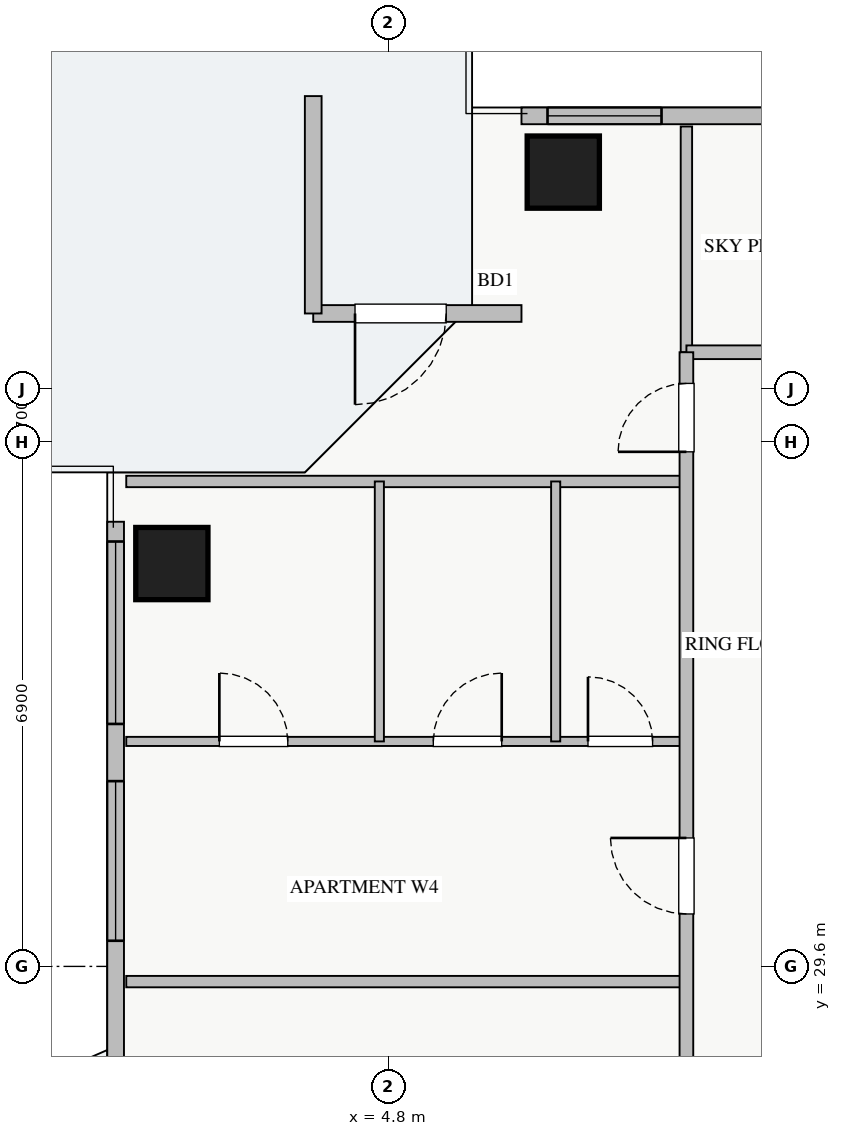
"""IFC4 building model, lengths in metres.
Left out: names, types, materials, properties, quantities, classifications, styles, units other than length and angle.
Written with IfcOpenShell. Run it as: python <this file> out.ifc"""

import sys

from ifc_helpers import new_model, si_unit, direction, frame, frame_2d, origin, origin_2d, place, context, subcontext, project, spatial, rectangle, extrude, source, transform, mapped, element, fill, save


model = new_model("IFC4")
c1 = context("Model", 3, precision=1e-05, world=origin(), true_north=direction((0.0, 1.0)))
c2 = subcontext(c1, "Body", "Model", "MODEL_VIEW")
j1 = project(units=[si_unit("LENGTHUNIT", "METRE"), si_unit("PLANEANGLEUNIT", "RADIAN")], contexts=[c1])
p1 = place(None, origin())
s1 = spatial("IfcSite", under=j1, at=p1, CompositionType="ELEMENT")
p2 = place(p1, origin())
s2 = spatial("IfcBuilding", under=s1, at=p2, CompositionType="ELEMENT")
p3 = place(p2, frame((0.0, 0.0, 182.75)))
s3 = spatial("IfcBuildingStorey", under=s2, at=p3, CompositionType="ELEMENT", Elevation=182.75)
m1 = source(origin(), c2, "Body", "SweptSolid", [
    extrude(rectangle(XDim=0.95, YDim=0.95, at=origin_2d()), origin(), (0.0, 0.0, 1.0), 3.25),
])
for number, where, z_axis, x_axis in (
    (1, (7.1, 40.05, 0.0), (0.0, 0.0, 1.0), (1.0, 0.0, 0.0)),
    (2, (1.95, 34.9, 0.0), (0.0, 0.0, 1.0), (1.0, 0.0, 0.0)),
):
    element("IfcColumn", number, at=place(p3, frame(where, z_axis=z_axis, x_axis=x_axis)), inside=s3, PredefinedType="COLUMN", context=c2, shape_type="MappedRepresentation", body=[
        mapped(m1, transform((0.0, 0.0, 0.0), x_axis=(1.0, 0.0, 0.0), y_axis=(0.0, 1.0, 0.0), z_axis=(0.0, 0.0, 1.0), scale=1.0)),
    ])
p4 = place(p3, frame((6.55, 40.79, 0.0), z_axis=(0.0, 0.0, 1.0), x_axis=(1.0, 0.0, 0.0)))
e3 = element("IfcWall", 3, at=p4, inside=s3, PredefinedType="STANDARD", context=c2, shape_type="SweptSolid", body=[
    extrude(rectangle(XDim=24.9, YDim=0.22, at=frame_2d((12.45, 0.0))), origin(), (0.0, 0.0, 1.0), 2.57),
])
p5 = place(p4, frame((13.3, 0.0, 0.0)))
e4 = element("IfcOpeningElement", 4, at=p5, cuts=e3, PredefinedType="OPENING", context=c2, shape_type="SweptSolid", body=[
    extrude(rectangle(XDim=1.2, YDim=2.1, at=frame_2d((0.6, 1.05))), frame((0.0, 0.12, 0.0), z_axis=(0.0, -1.0, 0.0), x_axis=(1.0, 0.0, 0.0)), (0.0, 0.0, 1.0), 0.24),
])
p6 = place(p4, frame((0.343, 0.0, 0.9)))
e5 = element("IfcOpeningElement", 5, at=p6, cuts=e3, PredefinedType="OPENING", context=c2, shape_type="SweptSolid", body=[
    extrude(rectangle(XDim=1.5, YDim=1.5, at=frame_2d((0.75, 0.75))), frame((0.0, 0.12, 0.0), z_axis=(0.0, -1.0, 0.0), x_axis=(1.0, 0.0, 0.0)), (0.0, 0.0, 1.0), 0.24),
])
p7 = place(p4, frame((9.79, 0.0, 0.9)))
e6 = element("IfcOpeningElement", 6, at=p7, cuts=e3, PredefinedType="OPENING", context=c2, shape_type="SweptSolid", body=[
    extrude(rectangle(XDim=1.8, YDim=1.5, at=frame_2d((0.9, 0.75))), frame((0.0, 0.12, 0.0), z_axis=(0.0, -1.0, 0.0), x_axis=(1.0, 0.0, 0.0)), (0.0, 0.0, 1.0), 0.24),
])
p8 = place(p4, frame((14.813, 0.0, 0.9)))
e7 = element("IfcOpeningElement", 7, at=p8, cuts=e3, PredefinedType="OPENING", context=c2, shape_type="SweptSolid", body=[
    extrude(rectangle(XDim=1.5, YDim=1.45, at=frame_2d((0.75, 0.725))), frame((0.0, 0.12, 0.0), z_axis=(0.0, -1.0, 0.0), x_axis=(1.0, 0.0, 0.0)), (0.0, 0.0, 1.0), 0.24),
])
p9 = place(p4, frame((20.738, 0.0, 0.9)))
e8 = element("IfcOpeningElement", 8, at=p9, cuts=e3, PredefinedType="OPENING", context=c2, shape_type="SweptSolid", body=[
    extrude(rectangle(XDim=2.1, YDim=1.48, at=frame_2d((1.05, 0.74))), frame((0.0, 0.12, 0.0), z_axis=(0.0, -1.0, 0.0), x_axis=(1.0, 0.0, 0.0)), (0.0, 0.0, 1.0), 0.24),
])
p10 = place(p4, frame((4.122, 0.0, 0.9)))
e9 = element("IfcOpeningElement", 9, at=p10, cuts=e3, PredefinedType="OPENING", context=c2, shape_type="SweptSolid", body=[
    extrude(rectangle(XDim=2.4, YDim=1.5, at=frame_2d((1.2, 0.75))), frame((0.0, 0.12, 0.0), z_axis=(0.0, -1.0, 0.0), x_axis=(1.0, 0.0, 0.0)), (0.0, 0.0, 1.0), 0.24),
])
p11 = place(p4, frame((6.758, 0.0, 0.9)))
e10 = element("IfcOpeningElement", 10, at=p11, cuts=e3, PredefinedType="OPENING", context=c2, shape_type="SweptSolid", body=[
    extrude(rectangle(XDim=1.8, YDim=1.5, at=frame_2d((0.9, 0.75))), frame((0.0, 0.12, 0.0), z_axis=(0.0, -1.0, 0.0), x_axis=(1.0, 0.0, 0.0)), (0.0, 0.0, 1.0), 0.24),
])
p12 = place(p3, frame((1.21, 10.55, 0.0), z_axis=(0.0, 0.0, 1.0), x_axis=(0.0, 1.0, 0.0)))
e11 = element("IfcWall", 11, at=p12, inside=s3, PredefinedType="STANDARD", context=c2, shape_type="SweptSolid", body=[
    extrude(rectangle(XDim=24.9, YDim=0.22, at=frame_2d((12.45, 0.0))), origin(), (0.0, 0.0, 1.0), 2.57),
])
p13 = place(p12, frame((13.3, 0.0, 0.0)))
e12 = element("IfcOpeningElement", 12, at=p13, cuts=e11, PredefinedType="OPENING", context=c2, shape_type="SweptSolid", body=[
    extrude(rectangle(XDim=1.2, YDim=2.1, at=frame_2d((0.6, 1.05))), frame((0.0, 0.12, 0.0), z_axis=(0.0, -1.0, 0.0), x_axis=(1.0, 0.0, 0.0)), (0.0, 0.0, 1.0), 0.24),
])
p14 = place(p12, frame((2.573, 0.0, 0.9)))
e13 = element("IfcOpeningElement", 13, at=p14, cuts=e11, PredefinedType="OPENING", context=c2, shape_type="SweptSolid", body=[
    extrude(rectangle(XDim=2.1, YDim=1.5, at=frame_2d((1.05, 0.75))), frame((0.0, 0.12, 0.0), z_axis=(0.0, -1.0, 0.0), x_axis=(1.0, 0.0, 0.0)), (0.0, 0.0, 1.0), 0.24),
])
p15 = place(p12, frame((19.387, 0.0, 0.9)))
e14 = element("IfcOpeningElement", 14, at=p15, cuts=e11, PredefinedType="OPENING", context=c2, shape_type="SweptSolid", body=[
    extrude(rectangle(XDim=2.1, YDim=1.5, at=frame_2d((1.05, 0.75))), frame((0.0, 0.12, 0.0), z_axis=(0.0, -1.0, 0.0), x_axis=(1.0, 0.0, 0.0)), (0.0, 0.0, 1.0), 0.24),
])
p16 = place(p12, frame((22.24, 0.0, 0.9)))
e15 = element("IfcOpeningElement", 15, at=p16, cuts=e11, PredefinedType="OPENING", context=c2, shape_type="SweptSolid", body=[
    extrude(rectangle(XDim=2.4, YDim=1.5, at=frame_2d((1.2, 0.75))), frame((0.0, 0.12, 0.0), z_axis=(0.0, -1.0, 0.0), x_axis=(1.0, 0.0, 0.0)), (0.0, 0.0, 1.0), 0.24),
])
p17 = place(p12, frame((0.25, 0.0, 0.9)))
e16 = element("IfcOpeningElement", 16, at=p17, cuts=e11, PredefinedType="OPENING", context=c2, shape_type="SweptSolid", body=[
    extrude(rectangle(XDim=0.9, YDim=1.2, at=frame_2d((0.45, 0.6))), frame((0.0, 0.12, 0.0), z_axis=(0.0, -1.0, 0.0), x_axis=(1.0, 0.0, 0.0)), (0.0, 0.0, 1.0), 0.24),
])
p18 = place(p12, frame((8.01, 0.0, 0.9)))
e17 = element("IfcOpeningElement", 17, at=p18, cuts=e11, PredefinedType="OPENING", context=c2, shape_type="SweptSolid", body=[
    extrude(rectangle(XDim=0.9, YDim=1.2, at=frame_2d((0.45, 0.6))), frame((0.0, 0.12, 0.0), z_axis=(0.0, -1.0, 0.0), x_axis=(1.0, 0.0, 0.0)), (0.0, 0.0, 1.0), 0.24),
])
p19 = place(p12, frame((5.215, 0.0, 0.9)))
e18 = element("IfcOpeningElement", 18, at=p19, cuts=e11, PredefinedType="OPENING", context=c2, shape_type="SweptSolid", body=[
    extrude(rectangle(XDim=0.9, YDim=1.2, at=frame_2d((0.45, 0.6))), frame((0.0, 0.12, 0.0), z_axis=(0.0, -1.0, 0.0), x_axis=(1.0, 0.0, 0.0)), (0.0, 0.0, 1.0), 0.24),
])
p20 = place(p3, frame((3.81, 38.19, 0.0), z_axis=(0.0, 0.0, 1.0), x_axis=(1.0, 0.0, 0.0)))
e19 = element("IfcWall", 19, at=p20, inside=s3, PredefinedType="STANDARD", context=c2, shape_type="SweptSolid", body=[
    extrude(rectangle(XDim=2.74, YDim=0.22, at=frame_2d((1.37, 0.0))), origin(), (0.0, 0.0, 1.0), 2.57),
])
p21 = place(p20, frame((0.55, 0.0, 0.0)))
e20 = element("IfcOpeningElement", 20, at=p21, cuts=e19, PredefinedType="OPENING", context=c2, shape_type="SweptSolid", body=[
    extrude(rectangle(XDim=1.2, YDim=2.1, at=frame_2d((0.6, 1.05))), frame((0.0, 0.12, 0.0), z_axis=(0.0, -1.0, 0.0), x_axis=(1.0, 0.0, 0.0)), (0.0, 0.0, 1.0), 0.24),
])
p22 = place(p3, frame((3.81, 38.19, 0.0), z_axis=(0.0, 0.0, 1.0), x_axis=(0.0, 1.0, 0.0)))
e21 = element("IfcWall", 21, at=p22, inside=s3, PredefinedType="STANDARD", context=c2, shape_type="SweptSolid", body=[
    extrude(rectangle(XDim=2.86, YDim=0.22, at=frame_2d((1.43, 0.0))), origin(), (0.0, 0.0, 1.0), 2.57),
])
p23 = place(p3, frame((8.72, 37.68, 0.0), z_axis=(0.0, 0.0, 1.0), x_axis=(0.0, 1.0, 0.0)))
e22 = element("IfcWall", 22, at=p23, inside=s3, PredefinedType="PARTITIONING", context=c2, shape_type="SweptSolid", body=[
    extrude(rectangle(XDim=2.97, YDim=0.15, at=frame_2d((1.485, 0.0))), origin(), (0.0, 0.0, 1.0), 3.03),
])
p24 = place(p3, frame((8.72, 37.68, 0.0), z_axis=(0.0, 0.0, 1.0), x_axis=(1.0, 0.0, 0.0)))
e23 = element("IfcWall", 23, at=p24, inside=s3, PredefinedType="PARTITIONING", context=c2, shape_type="SweptSolid", body=[
    extrude(rectangle(XDim=23.63, YDim=0.18, at=frame_2d((11.815, 0.0))), origin(), (0.0, 0.0, 1.0), 3.03),
])
p25 = place(p24, frame((2.83, 0.0, 0.0)))
e24 = element("IfcOpeningElement", 24, at=p25, cuts=e23, PredefinedType="OPENING", context=c2, shape_type="SweptSolid", body=[
    extrude(rectangle(XDim=1.0, YDim=2.05, at=frame_2d((0.5, 1.025))), frame((0.0, 0.1, 0.0), z_axis=(0.0, -1.0, 0.0), x_axis=(1.0, 0.0, 0.0)), (0.0, 0.0, 1.0), 0.2),
])
p26 = place(p24, frame((8.02, 0.0, 0.0)))
e25 = element("IfcOpeningElement", 25, at=p26, cuts=e23, PredefinedType="OPENING", context=c2, shape_type="SweptSolid", body=[
    extrude(rectangle(XDim=1.0, YDim=2.05, at=frame_2d((0.5, 1.025))), frame((0.0, 0.1, 0.0), z_axis=(0.0, -1.0, 0.0), x_axis=(1.0, 0.0, 0.0)), (0.0, 0.0, 1.0), 0.2),
])
p27 = place(p24, frame((13.41, 0.0, 0.0)))
e26 = element("IfcOpeningElement", 26, at=p27, cuts=e23, PredefinedType="OPENING", context=c2, shape_type="SweptSolid", body=[
    extrude(rectangle(XDim=1.0, YDim=2.05, at=frame_2d((0.5, 1.025))), frame((0.0, 0.1, 0.0), z_axis=(0.0, -1.0, 0.0), x_axis=(1.0, 0.0, 0.0)), (0.0, 0.0, 1.0), 0.2),
])
p28 = place(p24, frame((19.85, 0.0, 0.0)))
e27 = element("IfcOpeningElement", 27, at=p28, cuts=e23, PredefinedType="OPENING", context=c2, shape_type="SweptSolid", body=[
    extrude(rectangle(XDim=1.0, YDim=2.05, at=frame_2d((0.5, 1.025))), frame((0.0, 0.1, 0.0), z_axis=(0.0, -1.0, 0.0), x_axis=(1.0, 0.0, 0.0)), (0.0, 0.0, 1.0), 0.2),
])
p29 = place(p3, frame((1.35, 35.98, 0.0), z_axis=(0.0, 0.0, 1.0), x_axis=(1.0, 0.0, 0.0)))
e28 = element("IfcWall", 28, at=p29, inside=s3, PredefinedType="PARTITIONING", context=c2, shape_type="SweptSolid", body=[
    extrude(rectangle(XDim=7.37, YDim=0.15, at=frame_2d((3.685, 0.0))), origin(), (0.0, 0.0, 1.0), 3.03),
])
p30 = place(p3, frame((1.35, 32.56, 0.0), z_axis=(0.0, 0.0, 1.0), x_axis=(1.0, 0.0, 0.0)))
e29 = element("IfcWall", 29, at=p30, inside=s3, PredefinedType="PLUMBINGWALL", context=c2, shape_type="SweptSolid", body=[
    extrude(rectangle(XDim=7.37, YDim=0.12, at=frame_2d((3.685, 0.0))), origin(), (0.0, 0.0, 1.0), 3.03),
])
p31 = place(p30, frame((1.225, 0.0, 0.0)))
e30 = element("IfcOpeningElement", 30, at=p31, cuts=e29, PredefinedType="OPENING", context=c2, shape_type="SweptSolid", body=[
    extrude(rectangle(XDim=0.9, YDim=2.05, at=frame_2d((0.45, 1.025))), frame((0.0, 0.07, 0.0), z_axis=(0.0, -1.0, 0.0), x_axis=(1.0, 0.0, 0.0)), (0.0, 0.0, 1.0), 0.14),
])
p32 = place(p30, frame((4.04, 0.0, 0.0)))
e31 = element("IfcOpeningElement", 31, at=p32, cuts=e29, PredefinedType="OPENING", context=c2, shape_type="SweptSolid", body=[
    extrude(rectangle(XDim=0.9, YDim=2.05, at=frame_2d((0.45, 1.025))), frame((0.0, 0.07, 0.0), z_axis=(0.0, -1.0, 0.0), x_axis=(1.0, 0.0, 0.0)), (0.0, 0.0, 1.0), 0.14),
])
p33 = place(p30, frame((6.075, 0.0, 0.0)))
e32 = element("IfcOpeningElement", 32, at=p33, cuts=e29, PredefinedType="OPENING", context=c2, shape_type="SweptSolid", body=[
    extrude(rectangle(XDim=0.85, YDim=2.05, at=frame_2d((0.425, 1.025))), frame((0.0, 0.07, 0.0), z_axis=(0.0, -1.0, 0.0), x_axis=(1.0, 0.0, 0.0)), (0.0, 0.0, 1.0), 0.14),
])
p34 = place(p3, frame((4.68, 32.56, 0.0), z_axis=(0.0, 0.0, 1.0), x_axis=(0.0, 1.0, 0.0)))
e33 = element("IfcWall", 33, at=p34, inside=s3, PredefinedType="PLUMBINGWALL", context=c2, shape_type="SweptSolid", body=[
    extrude(rectangle(XDim=3.42, YDim=0.12, at=frame_2d((1.71, 0.0))), origin(), (0.0, 0.0, 1.0), 3.03),
])
p35 = place(p3, frame((7.0, 32.56, 0.0), z_axis=(0.0, 0.0, 1.0), x_axis=(0.0, 1.0, 0.0)))
e34 = element("IfcWall", 34, at=p35, inside=s3, PredefinedType="PLUMBINGWALL", context=c2, shape_type="SweptSolid", body=[
    extrude(rectangle(XDim=3.42, YDim=0.12, at=frame_2d((1.71, 0.0))), origin(), (0.0, 0.0, 1.0), 2.525),
])
p36 = place(p3, frame((1.35, 29.4, 0.0), z_axis=(0.0, 0.0, 1.0), x_axis=(1.0, 0.0, 0.0)))
e35 = element("IfcWall", 35, at=p36, inside=s3, PredefinedType="PARTITIONING", context=c2, shape_type="SweptSolid", body=[
    extrude(rectangle(XDim=7.37, YDim=0.15, at=frame_2d((3.685, 0.0))), origin(), (0.0, 0.0, 1.0), 3.03),
])
p37 = place(p3, frame((8.72, 8.31, 0.0), z_axis=(0.0, 0.0, 1.0), x_axis=(0.0, 1.0, 0.0)))
e36 = element("IfcWall", 36, at=p37, inside=s3, PredefinedType="PARTITIONING", context=c2, shape_type="SweptSolid", body=[
    extrude(rectangle(XDim=29.37, YDim=0.18, at=frame_2d((14.685, 0.0))), origin(), (0.0, 0.0, 1.0), 3.03),
])
p38 = place(p37, frame((28.06, 0.0, 0.0)))
e37 = element("IfcOpeningElement", 37, at=p38, cuts=e36, PredefinedType="OPENING", context=c2, shape_type="SweptSolid", body=[
    extrude(rectangle(XDim=0.9, YDim=2.05, at=frame_2d((0.45, 1.025))), frame((0.0, 0.1, 0.0), z_axis=(0.0, -1.0, 0.0), x_axis=(1.0, 0.0, 0.0)), (0.0, 0.0, 1.0), 0.2),
])
p39 = place(p37, frame((0.24, 0.0, 0.0)))
e38 = element("IfcOpeningElement", 38, at=p39, cuts=e36, PredefinedType="OPENING", context=c2, shape_type="SweptSolid", body=[
    extrude(rectangle(XDim=0.9, YDim=2.05, at=frame_2d((0.45, 1.025))), frame((0.0, 0.1, 0.0), z_axis=(0.0, -1.0, 0.0), x_axis=(1.0, 0.0, 0.0)), (0.0, 0.0, 1.0), 0.2),
])
p40 = place(p37, frame((2.25, 0.0, 0.0)))
e39 = element("IfcOpeningElement", 39, at=p40, cuts=e36, PredefinedType="OPENING", context=c2, shape_type="SweptSolid", body=[
    extrude(rectangle(XDim=1.0, YDim=2.05, at=frame_2d((0.5, 1.025))), frame((0.0, 0.1, 0.0), z_axis=(0.0, -1.0, 0.0), x_axis=(1.0, 0.0, 0.0)), (0.0, 0.0, 1.0), 0.2),
])
p41 = place(p37, frame((7.935, 0.0, 0.0)))
e40 = element("IfcOpeningElement", 40, at=p41, cuts=e36, PredefinedType="OPENING", context=c2, shape_type="SweptSolid", body=[
    extrude(rectangle(XDim=1.0, YDim=2.05, at=frame_2d((0.5, 1.025))), frame((0.0, 0.1, 0.0), z_axis=(0.0, -1.0, 0.0), x_axis=(1.0, 0.0, 0.0)), (0.0, 0.0, 1.0), 0.2),
])
p42 = place(p37, frame((17.3, 0.0, 0.0)))
e41 = element("IfcOpeningElement", 41, at=p42, cuts=e36, PredefinedType="OPENING", context=c2, shape_type="SweptSolid", body=[
    extrude(rectangle(XDim=1.0, YDim=2.05, at=frame_2d((0.5, 1.025))), frame((0.0, 0.1, 0.0), z_axis=(0.0, -1.0, 0.0), x_axis=(1.0, 0.0, 0.0)), (0.0, 0.0, 1.0), 0.2),
])
p43 = place(p37, frame((21.98, 0.0, 0.0)))
e42 = element("IfcOpeningElement", 42, at=p43, cuts=e36, PredefinedType="OPENING", context=c2, shape_type="SweptSolid", body=[
    extrude(rectangle(XDim=1.0, YDim=2.05, at=frame_2d((0.5, 1.025))), frame((0.0, 0.1, 0.0), z_axis=(0.0, -1.0, 0.0), x_axis=(1.0, 0.0, 0.0)), (0.0, 0.0, 1.0), 0.2),
])
m2 = source(origin(), c2, "Body", "SweptSolid", [
    extrude(rectangle(XDim=1.5, YDim=1.5, at=frame_2d((0.75, 0.75))), frame((0.0, 0.03, 0.0), z_axis=(0.0, -1.0, 0.0), x_axis=(1.0, 0.0, 0.0)), (0.0, 0.0, 1.0), 0.06),
])
p44 = place(p6, origin())
e43 = element("IfcWindow", 43, at=p44, inside=s3, PartitioningType="TRIPLE_PANEL_VERTICAL", PredefinedType="WINDOW", context=c2, shape_type="MappedRepresentation", body=[
    mapped(m2, transform((0.0, 0.0, 0.0), x_axis=(1.0, 0.0, 0.0), y_axis=(0.0, 1.0, 0.0), z_axis=(0.0, 0.0, 1.0), scale=1.0)),
])
fill(e5, e43)
m3 = source(origin(), c2, "Body", "SweptSolid", [
    extrude(rectangle(XDim=2.1, YDim=1.5, at=frame_2d((1.05, 0.75))), frame((0.0, 0.03, 0.0), z_axis=(0.0, -1.0, 0.0), x_axis=(1.0, 0.0, 0.0)), (0.0, 0.0, 1.0), 0.06),
])
p45 = place(p15, origin())
e44 = element("IfcWindow", 44, at=p45, inside=s3, PartitioningType="TRIPLE_PANEL_VERTICAL", PredefinedType="WINDOW", context=c2, shape_type="MappedRepresentation", body=[
    mapped(m3, transform((0.0, 0.0, 0.0), x_axis=(1.0, 0.0, 0.0), y_axis=(0.0, 1.0, 0.0), z_axis=(0.0, 0.0, 1.0), scale=1.0)),
])
fill(e14, e44)
m4 = source(origin(), c2, "Body", "SweptSolid", [
    extrude(rectangle(XDim=1.2, YDim=2.1, at=frame_2d((0.6, 1.05))), frame((0.0, 0.025, 0.0), z_axis=(0.0, -1.0, 0.0), x_axis=(1.0, 0.0, 0.0)), (0.0, 0.0, 1.0), 0.05),
])
p46 = place(p21, frame((1.2, 0.0, 0.0), z_axis=(0.0, 0.0, 1.0), x_axis=(-1.0, 0.0, 0.0)))
e45 = element("IfcDoor", 45, at=p46, inside=s3, OperationType="SINGLE_SWING_LEFT", PredefinedType="DOOR", context=c2, shape_type="MappedRepresentation", body=[
    mapped(m4, transform((0.0, 0.0, 0.0), x_axis=(1.0, 0.0, 0.0), y_axis=(0.0, 1.0, 0.0), z_axis=(0.0, 0.0, 1.0), scale=1.0)),
])
fill(e20, e45)
m5 = source(origin(), c2, "Body", "SweptSolid", [
    extrude(rectangle(XDim=0.9, YDim=2.05, at=frame_2d((0.45, 1.025))), frame((0.0, 0.025, 0.0), z_axis=(0.0, -1.0, 0.0), x_axis=(1.0, 0.0, 0.0)), (0.0, 0.0, 1.0), 0.05),
])
p47 = place(p31, origin())
e46 = element("IfcDoor", 46, at=p47, inside=s3, OperationType="SINGLE_SWING_LEFT", PredefinedType="DOOR", context=c2, shape_type="MappedRepresentation", body=[
    mapped(m5, transform((0.0, 0.0, 0.0), x_axis=(1.0, 0.0, 0.0), y_axis=(0.0, 1.0, 0.0), z_axis=(0.0, 0.0, 1.0), scale=1.0)),
])
fill(e30, e46)
p48 = place(p32, origin())
e47 = element("IfcDoor", 47, at=p48, inside=s3, OperationType="SINGLE_SWING_RIGHT", PredefinedType="DOOR", context=c2, shape_type="MappedRepresentation", body=[
    mapped(m5, transform((0.0, 0.0, 0.0), x_axis=(1.0, 0.0, 0.0), y_axis=(0.0, 1.0, 0.0), z_axis=(0.0, 0.0, 1.0), scale=1.0)),
])
fill(e31, e47)
m6 = source(origin(), c2, "Body", "SweptSolid", [
    extrude(rectangle(XDim=0.85, YDim=2.05, at=frame_2d((0.425, 1.025))), frame((0.0, 0.025, 0.0), z_axis=(0.0, -1.0, 0.0), x_axis=(1.0, 0.0, 0.0)), (0.0, 0.0, 1.0), 0.05),
])
p49 = place(p33, origin())
e48 = element("IfcDoor", 48, at=p49, inside=s3, OperationType="SINGLE_SWING_LEFT", PredefinedType="DOOR", context=c2, shape_type="MappedRepresentation", body=[
    mapped(m6, transform((0.0, 0.0, 0.0), x_axis=(1.0, 0.0, 0.0), y_axis=(0.0, 1.0, 0.0), z_axis=(0.0, 0.0, 1.0), scale=1.0)),
])
fill(e32, e48)
p50 = place(p38, origin())
e49 = element("IfcDoor", 49, at=p50, inside=s3, OperationType="SINGLE_SWING_LEFT", PredefinedType="DOOR", context=c2, shape_type="MappedRepresentation", body=[
    mapped(m5, transform((0.0, 0.0, 0.0), x_axis=(1.0, 0.0, 0.0), y_axis=(0.0, 1.0, 0.0), z_axis=(0.0, 0.0, 1.0), scale=1.0)),
])
fill(e37, e49)
m7 = source(origin(), c2, "Body", "SweptSolid", [
    extrude(rectangle(XDim=1.0, YDim=2.05, at=frame_2d((0.5, 1.025))), frame((0.0, 0.025, 0.0), z_axis=(0.0, -1.0, 0.0), x_axis=(1.0, 0.0, 0.0)), (0.0, 0.0, 1.0), 0.05),
])
p51 = place(p43, origin())
e50 = element("IfcDoor", 50, at=p51, inside=s3, OperationType="SINGLE_SWING_RIGHT", PredefinedType="DOOR", context=c2, shape_type="MappedRepresentation", body=[
    mapped(m7, transform((0.0, 0.0, 0.0), x_axis=(1.0, 0.0, 0.0), y_axis=(0.0, 1.0, 0.0), z_axis=(0.0, 0.0, 1.0), scale=1.0)),
])
fill(e42, e50)
m8 = source(origin(), c2, "Body", "SweptSolid", [
    extrude(rectangle(XDim=2.4, YDim=1.5, at=frame_2d((1.2, 0.75))), frame((0.0, 0.03, 0.0), z_axis=(0.0, -1.0, 0.0), x_axis=(1.0, 0.0, 0.0)), (0.0, 0.0, 1.0), 0.06),
])
p52 = place(p16, origin())
e51 = element("IfcWindow", 51, at=p52, inside=s3, PartitioningType="TRIPLE_PANEL_VERTICAL", PredefinedType="WINDOW", context=c2, shape_type="MappedRepresentation", body=[
    mapped(m8, transform((0.0, 0.0, 0.0), x_axis=(1.0, 0.0, 0.0), y_axis=(0.0, 1.0, 0.0), z_axis=(0.0, 0.0, 1.0), scale=1.0)),
])
fill(e15, e51)
save(model, sys.argv[1])
